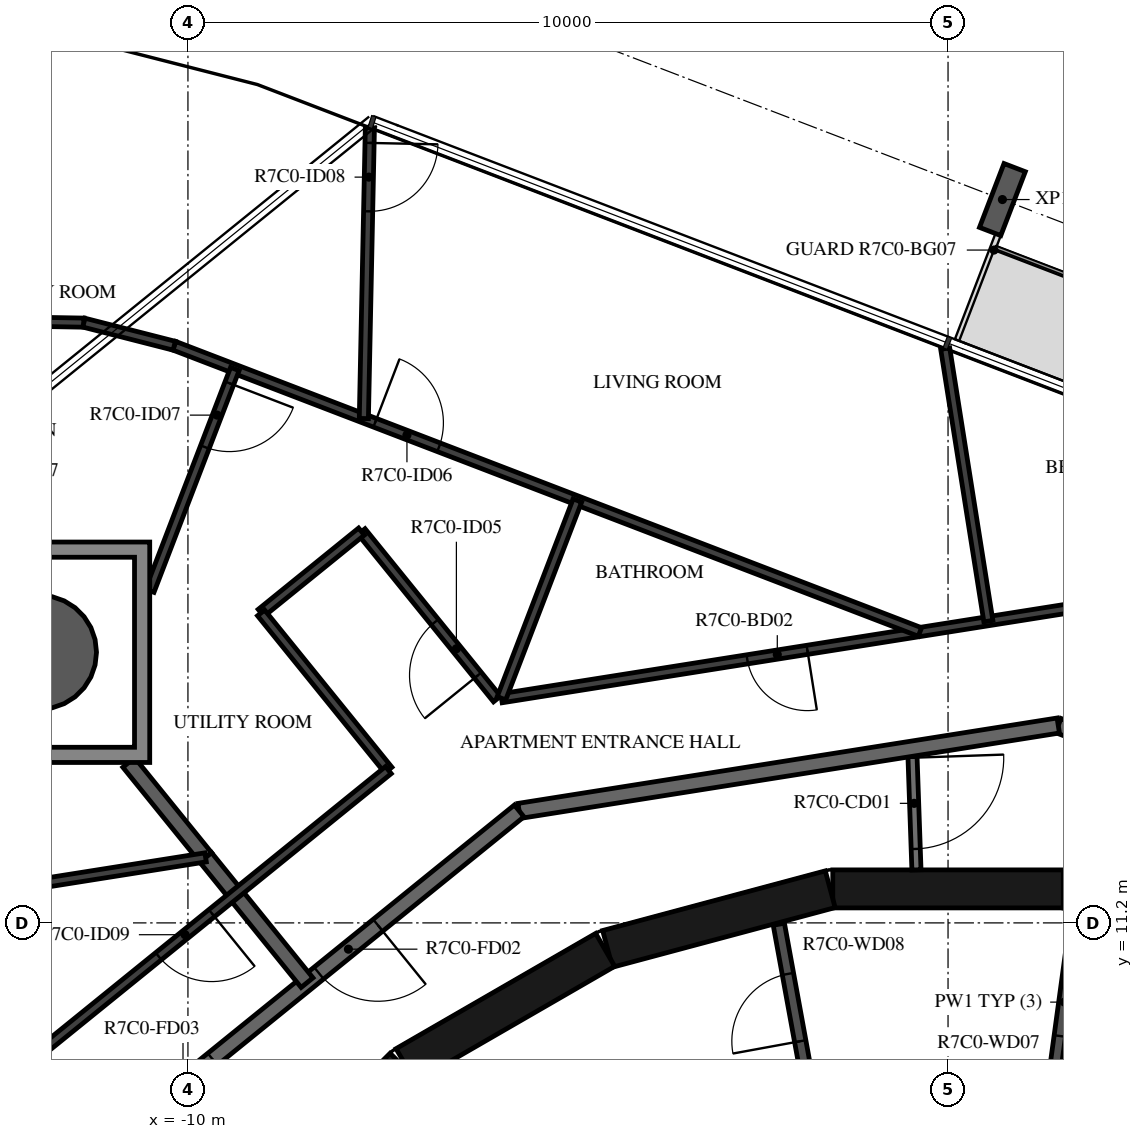
"""IFC4 building model, lengths in metres.
Left out: names, types, materials, properties, quantities, classifications, styles, units other than length and angle.
Written with IfcOpenShell. Run it as: python <this file> out.ifc"""

import sys

from ifc_helpers import new_model, si_unit, direction, frame, frame_2d, origin, origin_2d, place, context, subcontext, project, spatial, polyline, rectangle, hollow_circle, i_section, outline, extrude, element, fill, save


model = new_model("IFC4")
c1 = context("Model", 3, precision=1e-05, world=origin(), true_north=direction((0.0, 1.0)))
c2 = subcontext(c1, "Body", "Model", "MODEL_VIEW")
j1 = project(units=[si_unit("LENGTHUNIT", "METRE"), si_unit("PLANEANGLEUNIT", "RADIAN")], contexts=[c1])
p1 = place(None, origin())
s1 = spatial("IfcSite", under=j1, at=p1, CompositionType="ELEMENT")
p2 = place(p1, origin())
s2 = spatial("IfcBuilding", under=s1, at=p2, CompositionType="ELEMENT")
p3 = place(p2, frame((0.0, 0.0, 284.4)))
s3 = spatial("IfcBuildingStorey", under=s2, at=p3, CompositionType="ELEMENT", Elevation=284.4)
p4 = place(p3, frame((-11.953, 14.76, -0.38), z_axis=(0.0, 0.0, 1.0), x_axis=(1.0, 0.0, 0.0)))
e1 = element("IfcColumn", 1, at=p4, inside=s3, PredefinedType="COLUMN", context=c2, shape_type="SweptSolid", body=[
    extrude(hollow_circle(Radius=0.75, WallThickness=0.035, at=origin_2d()), origin(), (0.0, 0.0, 1.0), 3.5),
])
p5 = place(p3, frame((0.715, 20.716, -0.38), z_axis=(0.0, 0.0, 1.0), x_axis=(0.933580354843, -0.35836813621, 0.0)))
e2 = element("IfcColumn", 2, at=p5, inside=s3, PredefinedType="COLUMN", context=c2, shape_type="SweptSolid", body=[
    extrude(i_section(OverallWidth=0.3, OverallDepth=0.9, WebThickness=0.019, FlangeThickness=0.035, FilletRadius=0.03, at=origin_2d()), origin(), (0.0, 0.0, 1.0), 3.5),
])
for number, where, z_axis, x_axis in (
    (3, (4.479, 10.858, 0.0), (0.0, 0.0, 1.0), (-0.966, 0.259, 0.0)),
    (4, (1.516, 11.647, 0.0), (0.0, 0.0, 1.0), (-1.0, 0.0, 0.0)),
    (5, (-1.55, 11.643, 0.0), (0.0, 0.0, 1.0), (-0.966, -0.259, 0.0)),
    (6, (-4.51, 10.845, 0.0), (0.0, 0.0, 1.0), (-0.866, -0.5, 0.0)),
):
    element("IfcWall", number, at=place(p3, frame(where, z_axis=z_axis, x_axis=x_axis)), inside=s3, PredefinedType="SHEAR", context=c2, shape_type="SweptSolid", body=[
        extrude(rectangle(XDim=3.033, YDim=0.5, at=frame_2d((1.516, 0.0))), origin(), (0.0, 0.0, 1.0), 3.12),
    ])
p6 = place(p3, frame((-7.164, 9.308, 0.0), z_axis=(0.0, 0.0, 1.0), x_axis=(-0.707106781187, -0.707106781187, 0.0)))
e7 = element("IfcWall", 7, at=p6, inside=s3, PredefinedType="SHEAR", context=c2, shape_type="SweptSolid", body=[
    extrude(rectangle(XDim=3.032, YDim=0.5, at=frame_2d((1.516, 0.0))), origin(), (0.0, 0.0, 1.0), 3.12),
])
p7 = place(p6, frame((1.416, 0.0, 0.0)))
e8 = element("IfcOpeningElement", 8, at=p7, cuts=e7, PredefinedType="OPENING", context=c2, shape_type="SweptSolid", body=[
    extrude(rectangle(XDim=1.2, YDim=2.1, at=frame_2d((0.6, 1.05))), frame((0.0, 0.26, 0.0), z_axis=(0.0, -1.0, 0.0), x_axis=(1.0, 0.0, 0.0)), (0.0, 0.0, 1.0), 0.52),
])
p8 = place(p3, frame((1.691, 11.326, 0.0), z_axis=(0.0, 0.0, 1.0), x_axis=(-0.135344253201, -0.990798633994, 0.0)))
e9 = element("IfcWall", 9, at=p8, inside=s3, PredefinedType="PARTITIONING", context=c2, shape_type="SweptSolid", body=[
    extrude(rectangle(XDim=2.358, YDim=0.15, at=frame_2d((1.179, 0.0))), origin(), (0.0, 0.0, 1.0), 3.12),
])
p9 = place(p8, frame((0.729, 0.0, 0.0)))
e10 = element("IfcOpeningElement", 10, at=p9, cuts=e9, PredefinedType="OPENING", context=c2, shape_type="SweptSolid", body=[
    extrude(rectangle(XDim=0.9, YDim=2.1, at=frame_2d((0.45, 1.05))), frame((0.0, 0.085, 0.0), z_axis=(0.0, -1.0, 0.0), x_axis=(1.0, 0.0, 0.0)), (0.0, 0.0, 1.0), 0.17),
])
p10 = place(p3, frame((-1.825, 8.99, 0.0), z_axis=(0.0, 0.0, 1.0), x_axis=(-0.179955206115, 0.983674805915, 0.0)))
e11 = element("IfcWall", 11, at=p10, inside=s3, PredefinedType="PARTITIONING", context=c2, shape_type="SweptSolid", body=[
    extrude(rectangle(XDim=2.229, YDim=0.15, at=frame_2d((1.115, 0.0))), origin(), (0.0, 0.0, 1.0), 3.12),
])
p11 = place(p10, frame((0.665, 0.0, 0.0)))
e12 = element("IfcOpeningElement", 12, at=p11, cuts=e11, PredefinedType="OPENING", context=c2, shape_type="SweptSolid", body=[
    extrude(rectangle(XDim=0.9, YDim=2.1, at=frame_2d((0.45, 1.05))), frame((0.0, 0.085, 0.0), z_axis=(0.0, -1.0, 0.0), x_axis=(1.0, 0.0, 0.0)), (0.0, 0.0, 1.0), 0.17),
])
p12 = place(p3, frame((-0.471, 13.492, 0.0), z_axis=(0.0, 0.0, 1.0), x_axis=(0.034873173869, -0.999391745886, 0.0)))
e13 = element("IfcWall", 13, at=p12, inside=s3, PredefinedType="PARTITIONING", context=c2, shape_type="SweptSolid", body=[
    extrude(rectangle(XDim=1.596, YDim=0.12, at=frame_2d((0.798, 0.0))), origin(), (0.0, 0.0, 1.0), 3.12),
])
p13 = place(p12, frame((0.12, 0.0, 0.0)))
e14 = element("IfcOpeningElement", 14, at=p13, cuts=e13, PredefinedType="OPENING", context=c2, shape_type="SweptSolid", body=[
    extrude(rectangle(XDim=1.2, YDim=2.1, at=frame_2d((0.6, 1.05))), frame((0.0, 0.07, 0.0), z_axis=(0.0, -1.0, 0.0), x_axis=(1.0, 0.0, 0.0)), (0.0, 0.0, 1.0), 0.14),
])
p14 = place(p3, frame((8.154, 11.223, 0.0), z_axis=(0.0, 0.0, 1.0), x_axis=(-0.93359073609, 0.358341090983, 0.0)))
e15 = element("IfcWall", 15, at=p14, inside=s3, PredefinedType="STANDARD", context=c2, shape_type="SweptSolid", body=[
    extrude(rectangle(XDim=7.181, YDim=0.2, at=frame_2d((3.59, 0.0))), origin(), (0.0, 0.0, 1.0), 3.12),
])
p15 = place(p3, frame((1.45, 13.797, 0.0), z_axis=(0.0, 0.0, 1.0), x_axis=(-0.987690361611, -0.156421704315, 0.0)))
e16 = element("IfcWall", 16, at=p15, inside=s3, PredefinedType="STANDARD", context=c2, shape_type="SweptSolid", body=[
    extrude(rectangle(XDim=7.181, YDim=0.2, at=frame_2d((3.591, 0.0))), origin(), (0.0, 0.0, 1.0), 3.12),
])
p16 = place(p3, frame((-5.643, 12.673, 0.0), z_axis=(0.0, 0.0, 1.0), x_axis=(-0.777160148113, -0.629302871585, 0.0)))
e17 = element("IfcWall", 17, at=p16, inside=s3, PredefinedType="STANDARD", context=c2, shape_type="SweptSolid", body=[
    extrude(rectangle(XDim=7.181, YDim=0.2, at=frame_2d((3.59, 0.0))), origin(), (0.0, 0.0, 1.0), 3.12),
])
p17 = place(p16, frame((2.39, 0.0, 0.0)))
e18 = element("IfcOpeningElement", 18, at=p17, cuts=e17, PredefinedType="OPENING", context=c2, shape_type="SweptSolid", body=[
    extrude(rectangle(XDim=1.0, YDim=2.1, at=frame_2d((0.5, 1.05))), frame((0.0, 0.11, 0.0), z_axis=(0.0, -1.0, 0.0), x_axis=(1.0, 0.0, 0.0)), (0.0, 0.0, 1.0), 0.22),
])
p18 = place(p16, frame((5.19, 0.0, 0.0)))
e19 = element("IfcOpeningElement", 19, at=p18, cuts=e17, PredefinedType="OPENING", context=c2, shape_type="SweptSolid", body=[
    extrude(rectangle(XDim=1.0, YDim=2.1, at=frame_2d((0.5, 1.05))), frame((0.0, 0.11, 0.0), z_axis=(0.0, -1.0, 0.0), x_axis=(1.0, 0.0, 0.0)), (0.0, 0.0, 1.0), 0.22),
])
p19 = place(p3, frame((-9.768, 12.062, 0.0), z_axis=(0.0, 0.0, 1.0), x_axis=(0.629274383598, -0.777183215302, 0.0)))
e20 = element("IfcWall", 20, at=p19, inside=s3, PredefinedType="STANDARD", context=c2, shape_type="SweptSolid", body=[
    extrude(rectangle(XDim=2.121, YDim=0.2, at=frame_2d((1.061, 0.0))), origin(), (0.0, 0.0, 1.0), 3.12),
])
p20 = place(p3, frame((-10.779, 13.311, 0.0), z_axis=(0.0, 0.0, 1.0), x_axis=(0.629373100483, -0.77710327524, 0.0)))
e21 = element("IfcWall", 21, at=p20, inside=s3, PredefinedType="STANDARD", context=c2, shape_type="SweptSolid", body=[
    extrude(rectangle(XDim=1.606, YDim=0.2, at=frame_2d((0.803, 0.0))), origin(), (0.0, 0.0, 1.0), 3.12),
])
p21 = place(p3, frame((1.612, 15.341, 0.0), z_axis=(0.0, 0.0, 1.0), x_axis=(-0.987690790621, -0.156418995404, 0.0)))
e22 = element("IfcWall", 22, at=p21, inside=s3, PredefinedType="PARTITIONING", context=c2, shape_type="SweptSolid", body=[
    extrude(rectangle(XDim=7.581, YDim=0.12, at=frame_2d((3.791, 0.0))), origin(), (0.0, 0.0, 1.0), 3.12),
])
p22 = place(p21, frame((3.507, 0.0, 0.0)))
e23 = element("IfcOpeningElement", 23, at=p22, cuts=e22, PredefinedType="OPENING", context=c2, shape_type="SweptSolid", body=[
    extrude(rectangle(XDim=0.8, YDim=2.1, at=frame_2d((0.4, 1.05))), frame((0.0, 0.07, 0.0), z_axis=(0.0, -1.0, 0.0), x_axis=(1.0, 0.0, 0.0)), (0.0, 0.0, 1.0), 0.14),
])
p23 = place(p3, frame((-5.933, 14.146, 0.0), z_axis=(0.0, 0.0, 1.0), x_axis=(-0.62930727886, 0.777156579316, 0.0)))
e24 = element("IfcWall", 24, at=p23, inside=s3, PredefinedType="PARTITIONING", context=c2, shape_type="SweptSolid", body=[
    extrude(rectangle(XDim=2.833, YDim=0.12, at=frame_2d((1.417, 0.0))), origin(), (0.0, 0.0, 1.0), 3.12),
])
p24 = place(p23, frame((0.4, 0.0, 0.0)))
e25 = element("IfcOpeningElement", 25, at=p24, cuts=e24, PredefinedType="OPENING", context=c2, shape_type="SweptSolid", body=[
    extrude(rectangle(XDim=0.9, YDim=2.1, at=frame_2d((0.45, 1.05))), frame((0.0, 0.07, 0.0), z_axis=(0.0, -1.0, 0.0), x_axis=(1.0, 0.0, 0.0)), (0.0, 0.0, 1.0), 0.14),
])
p25 = place(p3, frame((-7.717, 16.348, 0.0), z_axis=(0.0, 0.0, 1.0), x_axis=(-0.777184671515, -0.629272585103, 0.0)))
e26 = element("IfcWall", 26, at=p25, inside=s3, PredefinedType="PARTITIONING", context=c2, shape_type="SweptSolid", body=[
    extrude(rectangle(XDim=1.7, YDim=0.12, at=frame_2d((0.85, 0.0))), origin(), (0.0, 0.0, 1.0), 3.12),
])
p26 = place(p3, frame((-9.038, 15.278, 0.0), z_axis=(0.0, 0.0, 1.0), x_axis=(0.629338090938, -0.777131628037, 0.0)))
e27 = element("IfcWall", 27, at=p26, inside=s3, PredefinedType="PARTITIONING", context=c2, shape_type="SweptSolid", body=[
    extrude(rectangle(XDim=2.661, YDim=0.12, at=frame_2d((1.331, 0.0))), origin(), (0.0, 0.0, 1.0), 3.12),
])
p27 = place(p3, frame((-7.363, 13.21, 0.0), z_axis=(0.0, 0.0, 1.0), x_axis=(-0.777139504663, -0.629328364443, 0.0)))
e28 = element("IfcWall", 28, at=p27, inside=s3, PredefinedType="PARTITIONING", context=c2, shape_type="SweptSolid", body=[
    extrude(rectangle(XDim=6.584, YDim=0.12, at=frame_2d((3.292, 0.0))), origin(), (0.0, 0.0, 1.0), 3.12),
])
p28 = place(p27, frame((2.991, 0.0, 0.0)))
e29 = element("IfcOpeningElement", 29, at=p28, cuts=e28, PredefinedType="OPENING", context=c2, shape_type="SweptSolid", body=[
    extrude(rectangle(XDim=0.9, YDim=2.1, at=frame_2d((0.45, 1.05))), frame((0.0, 0.07, 0.0), z_axis=(0.0, -1.0, 0.0), x_axis=(1.0, 0.0, 0.0)), (0.0, 0.0, 1.0), 0.14),
])
p29 = place(p3, frame((-0.037, 18.756, 0.0), z_axis=(0.0, 0.0, 1.0), x_axis=(0.156421851095, -0.987690338365, 0.0)))
e30 = element("IfcWall", 30, at=p29, inside=s3, PredefinedType="PARTITIONING", context=c2, shape_type="SweptSolid", body=[
    extrude(rectangle(XDim=3.63, YDim=0.12, at=frame_2d((1.815, 0.0))), origin(), (0.0, 0.0, 1.0), 3.12),
])
p30 = place(p3, frame((-10.18, 18.793, 0.0), z_axis=(0.0, 0.0, 1.0), x_axis=(0.933574148929, -0.358384302742, 0.0)))
e31 = element("IfcWall", 31, at=p30, inside=s3, PredefinedType="PARTITIONING", context=c2, shape_type="SweptSolid", body=[
    extrude(rectangle(XDim=10.509, YDim=0.12, at=frame_2d((5.254, 0.0))), origin(), (0.0, 0.0, 1.0), 3.12),
])
p31 = place(p30, frame((2.829, 0.0, 0.0)))
e32 = element("IfcOpeningElement", 32, at=p31, cuts=e31, PredefinedType="OPENING", context=c2, shape_type="SweptSolid", body=[
    extrude(rectangle(XDim=0.9, YDim=2.1, at=frame_2d((0.45, 1.05))), frame((0.0, 0.07, 0.0), z_axis=(0.0, -1.0, 0.0), x_axis=(1.0, 0.0, 0.0)), (0.0, 0.0, 1.0), 0.14),
])
p32 = place(p3, frame((-7.606, 21.661, 0.0), z_axis=(0.0, 0.0, 1.0), x_axis=(-0.020735808663, -0.999784990005, 0.0)))
e33 = element("IfcWall", 33, at=p32, inside=s3, PredefinedType="PARTITIONING", context=c2, shape_type="SweptSolid", body=[
    extrude(rectangle(XDim=3.826, YDim=0.12, at=frame_2d((1.913, 0.0))), origin(), (0.0, 0.0, 1.0), 3.12),
])
p33 = place(p32, frame((0.2, 0.0, 0.0)))
e34 = element("IfcOpeningElement", 34, at=p33, cuts=e33, PredefinedType="OPENING", context=c2, shape_type="SweptSolid", body=[
    extrude(rectangle(XDim=0.9, YDim=2.1, at=frame_2d((0.45, 1.05))), frame((0.0, 0.07, 0.0), z_axis=(0.0, -1.0, 0.0), x_axis=(1.0, 0.0, 0.0)), (0.0, 0.0, 1.0), 0.14),
])
p34 = place(p3, frame((-4.876, 16.757, 0.0), z_axis=(0.0, 0.0, 1.0), x_axis=(-0.358380240487, -0.933575708354, 0.0)))
e35 = element("IfcWall", 35, at=p34, inside=s3, PredefinedType="PARTITIONING", context=c2, shape_type="SweptSolid", body=[
    extrude(rectangle(XDim=2.787, YDim=0.12, at=frame_2d((1.394, 0.0))), origin(), (0.0, 0.0, 1.0), 3.12),
])
p35 = place(p3, frame((-9.383, 18.487, 0.0), z_axis=(0.0, 0.0, 1.0), x_axis=(-0.358340198137, -0.933591078792, 0.0)))
e36 = element("IfcWall", 36, at=p35, inside=s3, PredefinedType="PARTITIONING", context=c2, shape_type="SweptSolid", body=[
    extrude(rectangle(XDim=3.125, YDim=0.12, at=frame_2d((1.562, 0.0))), origin(), (0.0, 0.0, 1.0), 3.12),
])
p36 = place(p35, frame((0.2, 0.0, 0.0)))
e37 = element("IfcOpeningElement", 37, at=p36, cuts=e36, PredefinedType="OPENING", context=c2, shape_type="SweptSolid", body=[
    extrude(rectangle(XDim=0.9, YDim=2.1, at=frame_2d((0.45, 1.05))), frame((0.0, 0.07, 0.0), z_axis=(0.0, -1.0, 0.0), x_axis=(1.0, 0.0, 0.0)), (0.0, 0.0, 1.0), 0.14),
])
p37 = place(p3, frame((-12.385, 19.115, 0.0), z_axis=(0.0, 0.0, 1.0), x_axis=(0.999850255535, -0.017305100577, 0.0)))
e38 = element("IfcWall", 38, at=p37, inside=s3, PredefinedType="PARTITIONING", context=c2, shape_type="SweptSolid", body=[
    extrude(rectangle(XDim=1.016, YDim=0.12, at=frame_2d((0.508, 0.0))), origin(), (0.0, 0.0, 1.0), 3.12),
])
p38 = place(p3, frame((-11.369, 19.097, 0.0), z_axis=(0.0, 0.0, 1.0), x_axis=(0.968877104853, -0.247542230117, 0.0)))
e39 = element("IfcWall", 39, at=p38, inside=s3, PredefinedType="PARTITIONING", context=c2, shape_type="SweptSolid", body=[
    extrude(rectangle(XDim=1.227, YDim=0.12, at=frame_2d((0.613, 0.0))), origin(), (0.0, 0.0, 1.0), 3.12),
])
p39 = place(p3, frame((-15.828, 11.102, 0.0), z_axis=(0.0, 0.0, 1.0), x_axis=(0.98768671358, 0.156444737262, 0.0)))
e40 = element("IfcWall", 40, at=p39, inside=s3, PredefinedType="PARTITIONING", context=c2, shape_type="SweptSolid", body=[
    extrude(rectangle(XDim=6.136, YDim=0.12, at=frame_2d((3.068, 0.0))), origin(), (0.0, 0.0, 1.0), 3.12),
])
p40 = place(p39, frame((0.2, 0.0, 0.0)))
e41 = element("IfcOpeningElement", 41, at=p40, cuts=e40, PredefinedType="OPENING", context=c2, shape_type="SweptSolid", body=[
    extrude(rectangle(XDim=0.9, YDim=2.1, at=frame_2d((0.45, 1.05))), frame((0.0, 0.07, 0.0), z_axis=(0.0, -1.0, 0.0), x_axis=(1.0, 0.0, 0.0)), (0.0, 0.0, 1.0), 0.14),
])
p41 = place(p3, origin())
e42 = element("IfcWall", 42, at=p41, inside=s3, PredefinedType="STANDARD", context=c2, shape_type="SweptSolid", body=[
    extrude(outline(polyline([(-10.503, 16.21), (-10.503, 13.311), (-13.403, 13.311), (-13.403, 16.21), (-10.503, 16.21)]), holes=[polyline([(-13.203, 13.51), (-10.703, 13.51), (-10.703, 16.01), (-13.203, 16.01), (-13.203, 13.51)])]), origin(), (0.0, 0.0, 1.0), 3.12),
])
p42 = place(p9, origin())
e43 = element("IfcDoor", 43, at=p42, inside=s3, OperationType="SINGLE_SWING_LEFT", PredefinedType="DOOR", context=c2, shape_type="SweptSolid", body=[
    extrude(rectangle(XDim=0.9, YDim=2.1, at=frame_2d((0.45, 1.05))), frame((0.0, 0.025, 0.0), z_axis=(0.0, -1.0, 0.0), x_axis=(1.0, 0.0, 0.0)), (0.0, 0.0, 1.0), 0.05),
])
fill(e10, e43)
p43 = place(p11, origin())
e44 = element("IfcDoor", 44, at=p43, inside=s3, OperationType="SINGLE_SWING_RIGHT", PredefinedType="DOOR", context=c2, shape_type="SweptSolid", body=[
    extrude(rectangle(XDim=0.9, YDim=2.1, at=frame_2d((0.45, 1.05))), frame((0.0, 0.025, 0.0), z_axis=(0.0, -1.0, 0.0), x_axis=(1.0, 0.0, 0.0)), (0.0, 0.0, 1.0), 0.05),
])
fill(e12, e44)
p44 = place(p17, origin())
e45 = element("IfcDoor", 45, at=p44, inside=s3, OperationType="SINGLE_SWING_RIGHT", PredefinedType="DOOR", context=c2, shape_type="SweptSolid", body=[
    extrude(rectangle(XDim=1.0, YDim=2.1, at=frame_2d((0.5, 1.05))), frame((0.0, 0.025, 0.0), z_axis=(0.0, -1.0, 0.0), x_axis=(1.0, 0.0, 0.0)), (0.0, 0.0, 1.0), 0.05),
])
fill(e18, e45)
p45 = place(p22, origin())
e46 = element("IfcDoor", 46, at=p45, inside=s3, OperationType="SINGLE_SWING_RIGHT", PredefinedType="DOOR", context=c2, shape_type="SweptSolid", body=[
    extrude(rectangle(XDim=0.8, YDim=2.1, at=frame_2d((0.4, 1.05))), frame((0.0, 0.025, 0.0), z_axis=(0.0, -1.0, 0.0), x_axis=(1.0, 0.0, 0.0)), (0.0, 0.0, 1.0), 0.05),
])
fill(e23, e46)
p46 = place(p24, origin())
e47 = element("IfcDoor", 47, at=p46, inside=s3, OperationType="SINGLE_SWING_RIGHT", PredefinedType="DOOR", context=c2, shape_type="SweptSolid", body=[
    extrude(rectangle(XDim=0.9, YDim=2.1, at=frame_2d((0.45, 1.05))), frame((0.0, 0.025, 0.0), z_axis=(0.0, -1.0, 0.0), x_axis=(1.0, 0.0, 0.0)), (0.0, 0.0, 1.0), 0.05),
])
fill(e25, e47)
p47 = place(p31, origin())
e48 = element("IfcDoor", 48, at=p47, inside=s3, OperationType="SINGLE_SWING_RIGHT", PredefinedType="DOOR", context=c2, shape_type="SweptSolid", body=[
    extrude(rectangle(XDim=0.9, YDim=2.1, at=frame_2d((0.45, 1.05))), frame((0.0, 0.025, 0.0), z_axis=(0.0, -1.0, 0.0), x_axis=(1.0, 0.0, 0.0)), (0.0, 0.0, 1.0), 0.05),
])
fill(e32, e48)
p48 = place(p36, origin())
e49 = element("IfcDoor", 49, at=p48, inside=s3, OperationType="SINGLE_SWING_RIGHT", PredefinedType="DOOR", context=c2, shape_type="SweptSolid", body=[
    extrude(rectangle(XDim=0.9, YDim=2.1, at=frame_2d((0.45, 1.05))), frame((0.0, 0.025, 0.0), z_axis=(0.0, -1.0, 0.0), x_axis=(1.0, 0.0, 0.0)), (0.0, 0.0, 1.0), 0.05),
])
fill(e37, e49)
p49 = place(p33, origin())
e50 = element("IfcDoor", 50, at=p49, inside=s3, OperationType="SINGLE_SWING_RIGHT", PredefinedType="DOOR", context=c2, shape_type="SweptSolid", body=[
    extrude(rectangle(XDim=0.9, YDim=2.1, at=frame_2d((0.45, 1.05))), frame((0.0, 0.025, 0.0), z_axis=(0.0, -1.0, 0.0), x_axis=(1.0, 0.0, 0.0)), (0.0, 0.0, 1.0), 0.05),
])
fill(e34, e50)
p50 = place(p18, origin())
e51 = element("IfcDoor", 51, at=p50, inside=s3, OperationType="SINGLE_SWING_LEFT", PredefinedType="DOOR", context=c2, shape_type="SweptSolid", body=[
    extrude(rectangle(XDim=1.0, YDim=2.1, at=frame_2d((0.5, 1.05))), frame((0.0, 0.025, 0.0), z_axis=(0.0, -1.0, 0.0), x_axis=(1.0, 0.0, 0.0)), (0.0, 0.0, 1.0), 0.05),
])
fill(e19, e51)
p51 = place(p28, origin())
e52 = element("IfcDoor", 52, at=p51, inside=s3, OperationType="SINGLE_SWING_LEFT", PredefinedType="DOOR", context=c2, shape_type="SweptSolid", body=[
    extrude(rectangle(XDim=0.9, YDim=2.1, at=frame_2d((0.45, 1.05))), frame((0.0, 0.025, 0.0), z_axis=(0.0, -1.0, 0.0), x_axis=(1.0, 0.0, 0.0)), (0.0, 0.0, 1.0), 0.05),
])
fill(e29, e52)
p52 = place(p13, origin())
e53 = element("IfcDoor", 53, at=p52, inside=s3, OperationType="DOUBLE_DOOR_SINGLE_SWING", PredefinedType="DOOR", context=c2, shape_type="SweptSolid", body=[
    extrude(rectangle(XDim=1.2, YDim=2.1, at=frame_2d((0.6, 1.05))), frame((0.0, 0.025, 0.0), z_axis=(0.0, -1.0, 0.0), x_axis=(1.0, 0.0, 0.0)), (0.0, 0.0, 1.0), 0.05),
])
fill(e14, e53)
save(model, sys.argv[1])
